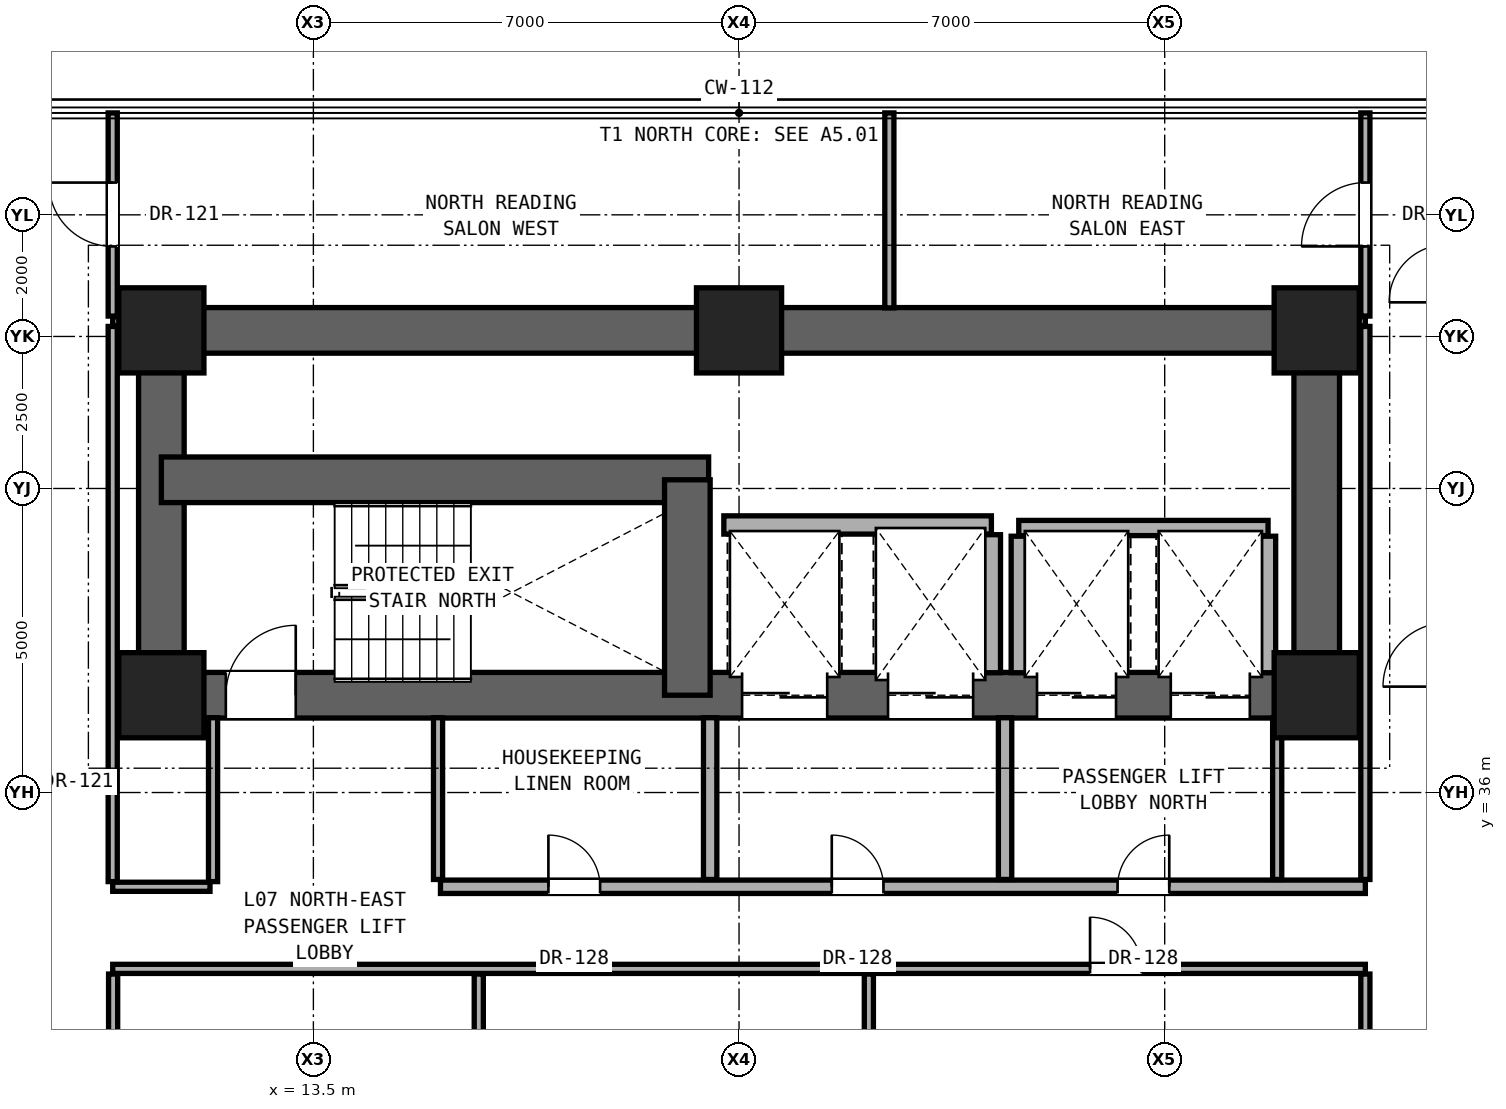
"""IFC4 building model, lengths in metres.
Left out: names, types, materials, properties, quantities, classifications, styles, units other than length and angle.
Written with IfcOpenShell. Run it as: python <this file> out.ifc"""

import sys

from ifc_helpers import new_model, si_unit, direction, frame, frame_2d, origin, origin_2d, place, context, subcontext, project, spatial, rectangle, extrude, element, fill, save


model = new_model("IFC4")
c1 = context("Model", 3, precision=1e-05, world=origin(), true_north=direction((0.0, 1.0)))
c2 = subcontext(c1, "Body", "Model", "MODEL_VIEW")
j1 = project(units=[si_unit("LENGTHUNIT", "METRE"), si_unit("PLANEANGLEUNIT", "RADIAN")], contexts=[c1])
p1 = place(None, origin())
s1 = spatial("IfcSite", under=j1, at=p1, CompositionType="ELEMENT")
p2 = place(p1, origin())
s2 = spatial("IfcBuilding", under=s1, at=p2, CompositionType="ELEMENT")
p3 = place(p2, frame((0.0, 0.0, 29.0)))
s3 = spatial("IfcBuildingStorey", under=s2, at=p3, CompositionType="ELEMENT", Elevation=29.0)
for number, where, z_axis, x_axis in (
    (1, (11.0, 37.6, 0.0), (0.0, 0.0, 1.0), (1.0, 0.0, 0.0)),
    (2, (30.0, 37.6, 0.0), (0.0, 0.0, 1.0), (1.0, 0.0, 0.0)),
    (3, (11.0, 43.6, 0.0), (0.0, 0.0, 1.0), (1.0, 0.0, 0.0)),
    (4, (20.5, 43.6, 0.0), (0.0, 0.0, 1.0), (1.0, 0.0, 0.0)),
    (5, (30.0, 43.6, 0.0), (0.0, 0.0, 1.0), (1.0, 0.0, 0.0)),
):
    element("IfcColumn", number, at=place(p3, frame(where, z_axis=z_axis, x_axis=x_axis)), inside=s3, PredefinedType="COLUMN", context=c2, shape_type="SweptSolid", body=[
        extrude(rectangle(XDim=1.4, YDim=1.4, at=origin_2d()), origin(), (0.0, 0.0, 1.0), 3.3),
    ])
p4 = place(p3, frame((11.0, 43.6, 0.0), z_axis=(0.0, 0.0, 1.0), x_axis=(1.0, 0.0, 0.0)))
e6 = element("IfcWall", 6, at=p4, inside=s3, PredefinedType="SHEAR", context=c2, shape_type="SweptSolid", body=[
    extrude(rectangle(XDim=19.0, YDim=0.75, at=frame_2d((9.5, 0.0))), origin(), (0.0, 0.0, 1.0), 3.06),
])
for number, where, z_axis, x_axis in (
    (7, (11.0, 37.6, 0.0), (0.0, 0.0, 1.0), (0.0, 1.0, 0.0)),
    (8, (30.0, 37.6, 0.0), (0.0, 0.0, 1.0), (0.0, 1.0, 0.0)),
):
    element("IfcWall", number, at=place(p3, frame(where, z_axis=z_axis, x_axis=x_axis)), inside=s3, PredefinedType="SHEAR", context=c2, shape_type="SweptSolid", body=[
        extrude(rectangle(XDim=6.0, YDim=0.75, at=frame_2d((3.0, 0.0))), origin(), (0.0, 0.0, 1.0), 3.06),
    ])
p5 = place(p3, frame((11.0, 37.6, 0.0), z_axis=(0.0, 0.0, 1.0), x_axis=(1.0, 0.0, 0.0)))
e9 = element("IfcWall", 9, at=p5, inside=s3, PredefinedType="SHEAR", context=c2, shape_type="SweptSolid", body=[
    extrude(rectangle(XDim=19.0, YDim=0.75, at=frame_2d((9.5, 0.0))), origin(), (0.0, 0.0, 1.0), 3.06),
])
p6 = place(p5, frame((1.06, 0.0, 0.0)))
e10 = element("IfcOpeningElement", 10, at=p6, cuts=e9, PredefinedType="OPENING", context=c2, shape_type="SweptSolid", body=[
    extrude(rectangle(XDim=1.15, YDim=2.2, at=frame_2d((0.575, 1.1))), frame((0.0, 0.385, 0.0), z_axis=(0.0, -1.0, 0.0), x_axis=(1.0, 0.0, 0.0)), (0.0, 0.0, 1.0), 0.77),
])
p7 = place(p5, frame((9.55, 0.0, 0.0)))
e11 = element("IfcOpeningElement", 11, at=p7, cuts=e9, PredefinedType="OPENING", context=c2, shape_type="SweptSolid", body=[
    extrude(rectangle(XDim=1.4, YDim=2.35, at=frame_2d((0.7, 1.175))), frame((0.0, 0.385, 0.0), z_axis=(0.0, -1.0, 0.0), x_axis=(1.0, 0.0, 0.0)), (0.0, 0.0, 1.0), 0.77),
])
p8 = place(p5, frame((11.95, 0.0, 0.0)))
e12 = element("IfcOpeningElement", 12, at=p8, cuts=e9, PredefinedType="OPENING", context=c2, shape_type="SweptSolid", body=[
    extrude(rectangle(XDim=1.4, YDim=2.35, at=frame_2d((0.7, 1.175))), frame((0.0, 0.385, 0.0), z_axis=(0.0, -1.0, 0.0), x_axis=(1.0, 0.0, 0.0)), (0.0, 0.0, 1.0), 0.77),
])
p9 = place(p5, frame((14.4, 0.0, 0.0)))
e13 = element("IfcOpeningElement", 13, at=p9, cuts=e9, PredefinedType="OPENING", context=c2, shape_type="SweptSolid", body=[
    extrude(rectangle(XDim=1.3, YDim=2.3, at=frame_2d((0.65, 1.15))), frame((0.0, 0.385, 0.0), z_axis=(0.0, -1.0, 0.0), x_axis=(1.0, 0.0, 0.0)), (0.0, 0.0, 1.0), 0.77),
])
p10 = place(p5, frame((16.6, 0.0, 0.0)))
e14 = element("IfcOpeningElement", 14, at=p10, cuts=e9, PredefinedType="OPENING", context=c2, shape_type="SweptSolid", body=[
    extrude(rectangle(XDim=1.3, YDim=2.3, at=frame_2d((0.65, 1.15))), frame((0.0, 0.385, 0.0), z_axis=(0.0, -1.0, 0.0), x_axis=(1.0, 0.0, 0.0)), (0.0, 0.0, 1.0), 0.77),
])
p11 = place(p3, frame((11.0, 41.143, 0.0), z_axis=(0.0, 0.0, 1.0), x_axis=(1.0, 0.0, 0.0)))
e15 = element("IfcWall", 15, at=p11, inside=s3, PredefinedType="SHEAR", context=c2, shape_type="SweptSolid", body=[
    extrude(rectangle(XDim=9.0, YDim=0.75, at=frame_2d((4.5, 0.0))), origin(), (0.0, 0.0, 1.0), 3.06),
])
p12 = place(p3, frame((19.65, 37.6, 0.0), z_axis=(0.0, 0.0, 1.0), x_axis=(0.0, 1.0, 0.0)))
e16 = element("IfcWall", 16, at=p12, inside=s3, PredefinedType="SHEAR", context=c2, shape_type="SweptSolid", body=[
    extrude(rectangle(XDim=3.543, YDim=0.75, at=frame_2d((1.771, 0.0))), origin(), (0.0, 0.0, 1.0), 3.06),
])
p13 = place(p3, frame((10.2, 33.1, 0.0), z_axis=(0.0, 0.0, 1.0), x_axis=(1.0, 0.0, 0.0)))
e17 = element("IfcWall", 17, at=p13, inside=s3, PredefinedType="PARTITIONING", context=c2, shape_type="SweptSolid", body=[
    extrude(rectangle(XDim=20.6, YDim=0.15, at=frame_2d((10.3, 0.0))), origin(), (0.0, 0.0, 1.0), 2.104),
])
p14 = place(p13, frame((16.073, 0.0, 0.0)))
e18 = element("IfcOpeningElement", 18, at=p14, cuts=e17, PredefinedType="OPENING", context=c2, shape_type="SweptSolid", body=[
    extrude(rectangle(XDim=0.85, YDim=2.01, at=frame_2d((0.425, 1.005))), frame((0.0, 0.085, 0.0), z_axis=(0.0, -1.0, 0.0), x_axis=(1.0, 0.0, 0.0)), (0.0, 0.0, 1.0), 0.17),
])
p15 = place(p3, frame((10.2, 34.45, 0.0), z_axis=(0.0, 0.0, 1.0), x_axis=(1.0, 0.0, 0.0)))
e19 = element("IfcWall", 19, at=p15, inside=s3, PredefinedType="PARTITIONING", context=c2, shape_type="SweptSolid", body=[
    extrude(rectangle(XDim=1.6, YDim=0.15, at=frame_2d((0.8, 0.0))), origin(), (0.0, 0.0, 1.0), 2.104),
])
p16 = place(p3, frame((15.59, 34.45, 0.0), z_axis=(0.0, 0.0, 1.0), x_axis=(1.0, 0.0, 0.0)))
e20 = element("IfcWall", 20, at=p16, inside=s3, PredefinedType="SOLIDWALL", context=c2, shape_type="SweptSolid", body=[
    extrude(rectangle(XDim=15.21, YDim=0.22, at=frame_2d((7.605, 0.0))), origin(), (0.0, 0.0, 1.0), 2.104),
])
p17 = place(p16, frame((6.435, 0.0, 0.0)))
e21 = element("IfcOpeningElement", 21, at=p17, cuts=e20, PredefinedType="OPENING", context=c2, shape_type="SweptSolid", body=[
    extrude(rectangle(XDim=0.85, YDim=2.01, at=frame_2d((0.425, 1.005))), frame((0.0, 0.12, 0.0), z_axis=(0.0, -1.0, 0.0), x_axis=(1.0, 0.0, 0.0)), (0.0, 0.0, 1.0), 0.24),
])
p18 = place(p16, frame((11.135, 0.0, 0.0)))
e22 = element("IfcOpeningElement", 22, at=p18, cuts=e20, PredefinedType="OPENING", context=c2, shape_type="SweptSolid", body=[
    extrude(rectangle(XDim=0.85, YDim=2.01, at=frame_2d((0.425, 1.005))), frame((0.0, 0.12, 0.0), z_axis=(0.0, -1.0, 0.0), x_axis=(1.0, 0.0, 0.0)), (0.0, 0.0, 1.0), 0.24),
])
p19 = place(p16, frame((1.775, 0.0, 0.0)))
e23 = element("IfcOpeningElement", 23, at=p19, cuts=e20, PredefinedType="OPENING", context=c2, shape_type="SweptSolid", body=[
    extrude(rectangle(XDim=0.85, YDim=2.01, at=frame_2d((0.425, 1.005))), frame((0.0, 0.12, 0.0), z_axis=(0.0, -1.0, 0.0), x_axis=(1.0, 0.0, 0.0)), (0.0, 0.0, 1.0), 0.24),
])
p20 = place(p3, frame((25.1, 40.35, 0.0), z_axis=(0.0, 0.0, 1.0), x_axis=(1.0, 0.0, 0.0)))
e24 = element("IfcWall", 24, at=p20, inside=s3, PredefinedType="SOLIDWALL", context=c2, shape_type="SweptSolid", body=[
    extrude(rectangle(XDim=4.1, YDim=0.25, at=frame_2d((2.05, 0.0))), origin(), (0.0, 0.0, 1.0), 3.06),
])
p21 = place(p3, frame((20.25, 40.4, 0.0), z_axis=(0.0, 0.0, 1.0), x_axis=(1.0, 0.0, 0.0)))
e25 = element("IfcWall", 25, at=p21, inside=s3, PredefinedType="SOLIDWALL", context=c2, shape_type="SweptSolid", body=[
    extrude(rectangle(XDim=4.4, YDim=0.3, at=frame_2d((2.2, 0.0))), origin(), (0.0, 0.0, 1.0), 3.06),
])
for number, where, z_axis, x_axis in (
    (26, (10.2, 43.75, 0.0), (0.0, 0.0, 1.0), (1.0, 0.0, 0.0)),
    (27, (30.37, 43.75, 0.0), (0.0, 0.0, 1.0), (1.0, 0.0, 0.0)),
):
    element("IfcWall", number, at=place(p3, frame(where, z_axis=z_axis, x_axis=x_axis)), inside=s3, PredefinedType="PARTITIONING", context=c2, shape_type="SweptSolid", body=[
        extrude(rectangle(XDim=0.43, YDim=0.15, at=frame_2d((0.215, 0.0))), origin(), (0.0, 0.0, 1.0), 3.06),
    ])
p22 = place(p3, frame((10.207, 22.935, 0.0), z_axis=(0.0, 0.0, 1.0), x_axis=(0.0, 1.0, 0.0)))
e28 = element("IfcWall", 28, at=p22, inside=s3, PredefinedType="PARTITIONING", context=c2, shape_type="SweptSolid", body=[
    extrude(rectangle(XDim=10.08, YDim=0.15, at=frame_2d((5.04, 0.0))), origin(), (0.0, 0.0, 1.0), 2.279),
])
p23 = place(p22, frame((4.565, 0.0, 0.0)))
e29 = element("IfcOpeningElement", 29, at=p23, cuts=e28, PredefinedType="OPENING", context=c2, shape_type="SweptSolid", body=[
    extrude(rectangle(XDim=0.95, YDim=2.15, at=frame_2d((0.475, 1.075))), frame((0.0, 0.085, 0.0), z_axis=(0.0, -1.0, 0.0), x_axis=(1.0, 0.0, 0.0)), (0.0, 0.0, 1.0), 0.17),
])
p24 = place(p3, frame((10.2, 34.535, 0.0), z_axis=(0.0, 0.0, 1.0), x_axis=(0.0, 1.0, 0.0)))
e30 = element("IfcWall", 30, at=p24, inside=s3, PredefinedType="PARTITIONING", context=c2, shape_type="SweptSolid", body=[
    extrude(rectangle(XDim=9.13, YDim=0.15, at=frame_2d((4.565, 0.0))), origin(), (0.0, 0.0, 1.0), 2.436),
])
p25 = place(p3, frame((10.2, 43.835, 0.0), z_axis=(0.0, 0.0, 1.0), x_axis=(0.0, 1.0, 0.0)))
e31 = element("IfcWall", 31, at=p25, inside=s3, PredefinedType="PARTITIONING", context=c2, shape_type="SweptSolid", body=[
    extrude(rectangle(XDim=3.341, YDim=0.15, at=frame_2d((1.67, 0.0))), origin(), (0.0, 0.0, 1.0), 3.06),
])
p26 = place(p25, frame((1.146, 0.0, 0.0)))
e32 = element("IfcOpeningElement", 32, at=p26, cuts=e31, PredefinedType="OPENING", context=c2, shape_type="SweptSolid", body=[
    extrude(rectangle(XDim=1.05, YDim=2.2, at=frame_2d((0.525, 1.1))), frame((0.0, 0.085, 0.0), z_axis=(0.0, -1.0, 0.0), x_axis=(1.0, 0.0, 0.0)), (0.0, 0.0, 1.0), 0.17),
])
p27 = place(p3, frame((11.85, 34.535, 0.0), z_axis=(0.0, 0.0, 1.0), x_axis=(0.0, 1.0, 0.0)))
e33 = element("IfcWall", 33, at=p27, inside=s3, PredefinedType="PARTITIONING", context=c2, shape_type="SweptSolid", body=[
    extrude(rectangle(XDim=2.695, YDim=0.15, at=frame_2d((1.348, 0.0))), origin(), (0.0, 0.0, 1.0), 3.06),
])
p28 = place(p3, frame((15.55, 34.57, 0.0), z_axis=(0.0, 0.0, 1.0), x_axis=(0.0, 1.0, 0.0)))
e34 = element("IfcWall", 34, at=p28, inside=s3, PredefinedType="PARTITIONING", context=c2, shape_type="SweptSolid", body=[
    extrude(rectangle(XDim=2.66, YDim=0.15, at=frame_2d((1.33, 0.0))), origin(), (0.0, 0.0, 1.0), 2.589),
])
p29 = place(p3, frame((16.22, 22.935, 0.0), z_axis=(0.0, 0.0, 1.0), x_axis=(0.0, 1.0, 0.0)))
e35 = element("IfcWall", 35, at=p29, inside=s3, PredefinedType="PARTITIONING", context=c2, shape_type="SweptSolid", body=[
    extrude(rectangle(XDim=10.08, YDim=0.15, at=frame_2d((5.04, 0.0))), origin(), (0.0, 0.0, 1.0), 2.104),
])
p30 = place(p3, frame((20.025, 34.57, 0.0), z_axis=(0.0, 0.0, 1.0), x_axis=(0.0, 1.0, 0.0)))
e36 = element("IfcWall", 36, at=p30, inside=s3, PredefinedType="SOLIDWALL", context=c2, shape_type="SweptSolid", body=[
    extrude(rectangle(XDim=2.66, YDim=0.22, at=frame_2d((1.33, 0.0))), origin(), (0.0, 0.0, 1.0), 3.06),
])
p31 = place(p3, frame((22.635, 19.985, 0.0), z_axis=(0.0, 0.0, 1.0), x_axis=(0.0, 1.0, 0.0)))
e37 = element("IfcWall", 37, at=p31, inside=s3, PredefinedType="PARTITIONING", context=c2, shape_type="SweptSolid", body=[
    extrude(rectangle(XDim=13.03, YDim=0.15, at=frame_2d((6.515, 0.0))), origin(), (0.0, 0.0, 1.0), 2.104),
])
p32 = place(p3, frame((22.972, 43.97, 0.0), z_axis=(0.0, 0.0, 1.0), x_axis=(0.0, 1.0, 0.0)))
e38 = element("IfcWall", 38, at=p32, inside=s3, PredefinedType="PARTITIONING", context=c2, shape_type="SweptSolid", body=[
    extrude(rectangle(XDim=3.206, YDim=0.15, at=frame_2d((1.603, 0.0))), origin(), (0.0, 0.0, 1.0), 3.06),
])
p33 = place(p3, frame((24.65, 37.97, 0.0), z_axis=(0.0, 0.0, 1.0), x_axis=(0.0, 1.0, 0.0)))
e39 = element("IfcWall", 39, at=p33, inside=s3, PredefinedType="SOLIDWALL", context=c2, shape_type="SweptSolid", body=[
    extrude(rectangle(XDim=2.27, YDim=0.3, at=frame_2d((1.135, 0.0))), origin(), (0.0, 0.0, 1.0), 3.06),
])
p34 = place(p3, frame((24.875, 34.57, 0.0), z_axis=(0.0, 0.0, 1.0), x_axis=(0.0, 1.0, 0.0)))
e40 = element("IfcWall", 40, at=p34, inside=s3, PredefinedType="SOLIDWALL", context=c2, shape_type="SweptSolid", body=[
    extrude(rectangle(XDim=2.66, YDim=0.22, at=frame_2d((1.33, 0.0))), origin(), (0.0, 0.0, 1.0), 3.06),
])
p35 = place(p3, frame((25.1, 37.97, 0.0), z_axis=(0.0, 0.0, 1.0), x_axis=(0.0, 1.0, 0.0)))
e41 = element("IfcWall", 41, at=p35, inside=s3, PredefinedType="SOLIDWALL", context=c2, shape_type="SweptSolid", body=[
    extrude(rectangle(XDim=2.245, YDim=0.25, at=frame_2d((1.123, 0.0))), origin(), (0.0, 0.0, 1.0), 3.06),
])
p36 = place(p3, frame((29.35, 34.57, 0.0), z_axis=(0.0, 0.0, 1.0), x_axis=(0.0, 1.0, 0.0)))
e42 = element("IfcWall", 42, at=p36, inside=s3, PredefinedType="PARTITIONING", context=c2, shape_type="SweptSolid", body=[
    extrude(rectangle(XDim=2.66, YDim=0.15, at=frame_2d((1.33, 0.0))), origin(), (0.0, 0.0, 1.0), 3.06),
])
p37 = place(p3, frame((29.2, 37.97, 0.0), z_axis=(0.0, 0.0, 1.0), x_axis=(0.0, 1.0, 0.0)))
e43 = element("IfcWall", 43, at=p37, inside=s3, PredefinedType="SOLIDWALL", context=c2, shape_type="SweptSolid", body=[
    extrude(rectangle(XDim=2.245, YDim=0.25, at=frame_2d((1.123, 0.0))), origin(), (0.0, 0.0, 1.0), 3.06),
])
p38 = place(p3, frame((30.8, 19.985, 0.0), z_axis=(0.0, 0.0, 1.0), x_axis=(0.0, 1.0, 0.0)))
e44 = element("IfcWall", 44, at=p38, inside=s3, PredefinedType="PARTITIONING", context=c2, shape_type="SweptSolid", body=[
    extrude(rectangle(XDim=13.03, YDim=0.15, at=frame_2d((6.515, 0.0))), origin(), (0.0, 0.0, 1.0), 2.279),
])
p39 = place(p3, frame((30.8, 34.57, 0.0), z_axis=(0.0, 0.0, 1.0), x_axis=(0.0, 1.0, 0.0)))
e45 = element("IfcWall", 45, at=p39, inside=s3, PredefinedType="PARTITIONING", context=c2, shape_type="SweptSolid", body=[
    extrude(rectangle(XDim=9.095, YDim=0.15, at=frame_2d((4.547, 0.0))), origin(), (0.0, 0.0, 1.0), 2.436),
])
p40 = place(p3, frame((30.8, 43.835, 0.0), z_axis=(0.0, 0.0, 1.0), x_axis=(0.0, 1.0, 0.0)))
e46 = element("IfcWall", 46, at=p40, inside=s3, PredefinedType="PARTITIONING", context=c2, shape_type="SweptSolid", body=[
    extrude(rectangle(XDim=3.341, YDim=0.15, at=frame_2d((1.67, 0.0))), origin(), (0.0, 0.0, 1.0), 3.06),
])
p41 = place(p40, frame((1.146, 0.0, 0.0)))
e47 = element("IfcOpeningElement", 47, at=p41, cuts=e46, PredefinedType="OPENING", context=c2, shape_type="SweptSolid", body=[
    extrude(rectangle(XDim=1.05, YDim=2.2, at=frame_2d((0.525, 1.1))), frame((0.0, 0.085, 0.0), z_axis=(0.0, -1.0, 0.0), x_axis=(1.0, 0.0, 0.0)), (0.0, 0.0, 1.0), 0.17),
])
p42 = place(p6, origin())
e48 = element("IfcDoor", 48, at=p42, inside=s3, OperationType="SINGLE_SWING_RIGHT", PredefinedType="DOOR", context=c2, shape_type="SweptSolid", body=[
    extrude(rectangle(XDim=1.15, YDim=2.2, at=frame_2d((0.575, 1.1))), frame((0.0, 0.025, 0.0), z_axis=(0.0, -1.0, 0.0), x_axis=(1.0, 0.0, 0.0)), (0.0, 0.0, 1.0), 0.05),
])
fill(e10, e48)
p43 = place(p17, origin())
e49 = element("IfcDoor", 49, at=p43, inside=s3, OperationType="SINGLE_SWING_LEFT", PredefinedType="DOOR", context=c2, shape_type="SweptSolid", body=[
    extrude(rectangle(XDim=0.85, YDim=2.01, at=frame_2d((0.425, 1.005))), frame((0.0, 0.025, 0.0), z_axis=(0.0, -1.0, 0.0), x_axis=(1.0, 0.0, 0.0)), (0.0, 0.0, 1.0), 0.05),
])
fill(e21, e49)
p44 = place(p18, origin())
e50 = element("IfcDoor", 50, at=p44, inside=s3, OperationType="SINGLE_SWING_RIGHT", PredefinedType="DOOR", context=c2, shape_type="SweptSolid", body=[
    extrude(rectangle(XDim=0.85, YDim=2.01, at=frame_2d((0.425, 1.005))), frame((0.0, 0.025, 0.0), z_axis=(0.0, -1.0, 0.0), x_axis=(1.0, 0.0, 0.0)), (0.0, 0.0, 1.0), 0.05),
])
fill(e22, e50)
p45 = place(p19, origin())
e51 = element("IfcDoor", 51, at=p45, inside=s3, OperationType="SINGLE_SWING_LEFT", PredefinedType="DOOR", context=c2, shape_type="SweptSolid", body=[
    extrude(rectangle(XDim=0.85, YDim=2.01, at=frame_2d((0.425, 1.005))), frame((0.0, 0.025, 0.0), z_axis=(0.0, -1.0, 0.0), x_axis=(1.0, 0.0, 0.0)), (0.0, 0.0, 1.0), 0.05),
])
fill(e23, e51)
p46 = place(p14, origin())
e52 = element("IfcDoor", 52, at=p46, inside=s3, OperationType="SINGLE_SWING_LEFT", PredefinedType="DOOR", context=c2, shape_type="SweptSolid", body=[
    extrude(rectangle(XDim=0.85, YDim=2.01, at=frame_2d((0.425, 1.005))), frame((0.0, 0.025, 0.0), z_axis=(0.0, -1.0, 0.0), x_axis=(1.0, 0.0, 0.0)), (0.0, 0.0, 1.0), 0.05),
])
fill(e18, e52)
p47 = place(p26, origin())
e53 = element("IfcDoor", 53, at=p47, inside=s3, OperationType="SINGLE_SWING_RIGHT", PredefinedType="DOOR", context=c2, shape_type="SweptSolid", body=[
    extrude(rectangle(XDim=1.05, YDim=2.2, at=frame_2d((0.525, 1.1))), frame((0.0, 0.025, 0.0), z_axis=(0.0, -1.0, 0.0), x_axis=(1.0, 0.0, 0.0)), (0.0, 0.0, 1.0), 0.05),
])
fill(e32, e53)
p48 = place(p41, origin())
e54 = element("IfcDoor", 54, at=p48, inside=s3, OperationType="SINGLE_SWING_LEFT", PredefinedType="DOOR", context=c2, shape_type="SweptSolid", body=[
    extrude(rectangle(XDim=1.05, YDim=2.2, at=frame_2d((0.525, 1.1))), frame((0.0, 0.025, 0.0), z_axis=(0.0, -1.0, 0.0), x_axis=(1.0, 0.0, 0.0)), (0.0, 0.0, 1.0), 0.05),
])
fill(e47, e54)
p49 = place(p7, origin())
e55 = element("IfcDoor", 55, at=p49, inside=s3, OperationType="DOUBLE_DOOR_SLIDING", PredefinedType="DOOR", context=c2, shape_type="SweptSolid", body=[
    extrude(rectangle(XDim=1.4, YDim=2.35, at=frame_2d((0.7, 1.175))), frame((0.0, 0.025, 0.0), z_axis=(0.0, -1.0, 0.0), x_axis=(1.0, 0.0, 0.0)), (0.0, 0.0, 1.0), 0.05),
])
fill(e11, e55)
p50 = place(p8, origin())
e56 = element("IfcDoor", 56, at=p50, inside=s3, OperationType="DOUBLE_DOOR_SLIDING", PredefinedType="DOOR", context=c2, shape_type="SweptSolid", body=[
    extrude(rectangle(XDim=1.4, YDim=2.35, at=frame_2d((0.7, 1.175))), frame((0.0, 0.025, 0.0), z_axis=(0.0, -1.0, 0.0), x_axis=(1.0, 0.0, 0.0)), (0.0, 0.0, 1.0), 0.05),
])
fill(e12, e56)
p51 = place(p9, origin())
e57 = element("IfcDoor", 57, at=p51, inside=s3, OperationType="DOUBLE_DOOR_SLIDING", PredefinedType="DOOR", context=c2, shape_type="SweptSolid", body=[
    extrude(rectangle(XDim=1.3, YDim=2.3, at=frame_2d((0.65, 1.15))), frame((0.0, 0.025, 0.0), z_axis=(0.0, -1.0, 0.0), x_axis=(1.0, 0.0, 0.0)), (0.0, 0.0, 1.0), 0.05),
])
fill(e13, e57)
p52 = place(p10, origin())
e58 = element("IfcDoor", 58, at=p52, inside=s3, OperationType="DOUBLE_DOOR_SLIDING", PredefinedType="DOOR", context=c2, shape_type="SweptSolid", body=[
    extrude(rectangle(XDim=1.3, YDim=2.3, at=frame_2d((0.65, 1.15))), frame((0.0, 0.025, 0.0), z_axis=(0.0, -1.0, 0.0), x_axis=(1.0, 0.0, 0.0)), (0.0, 0.0, 1.0), 0.05),
])
fill(e14, e58)
save(model, sys.argv[1])
